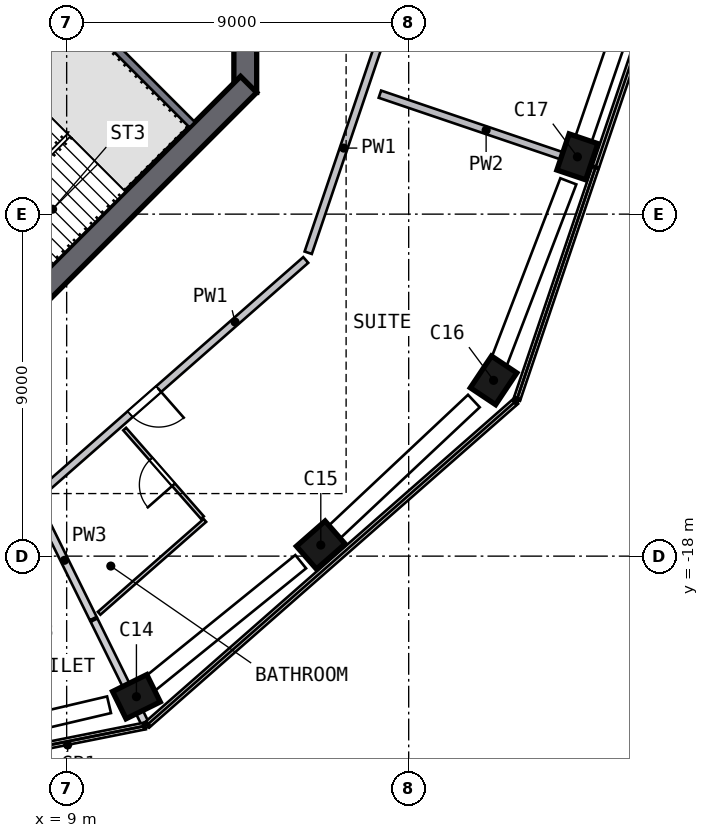
"""IFC4 building model, lengths in metres.
Left out: names, types, materials, properties, quantities, classifications, styles, units other than length and angle.
Written with IfcOpenShell. Run it as: python <this file> out.ifc"""

import sys

from ifc_helpers import new_model, si_unit, direction, frame, frame_2d, origin, origin_2d, place, context, subcontext, project, spatial, rectangle, extrude, element, fill, save


model = new_model("IFC4")
c1 = context("Model", 3, precision=1e-05, world=origin(), true_north=direction((0.0, 1.0)))
c2 = subcontext(c1, "Body", "Model", "MODEL_VIEW")
j1 = project(units=[si_unit("LENGTHUNIT", "METRE"), si_unit("PLANEANGLEUNIT", "RADIAN")], contexts=[c1])
p1 = place(None, origin())
s1 = spatial("IfcSite", under=j1, at=p1, CompositionType="ELEMENT")
p2 = place(p1, origin())
s2 = spatial("IfcBuilding", under=s1, at=p2, CompositionType="ELEMENT")
p3 = place(p2, frame((0.0, 0.0, 201.0)))
s3 = spatial("IfcBuildingStorey", under=s2, at=p3, CompositionType="ELEMENT", Elevation=201.0)
p4 = place(p3, frame((10.739, -21.748, 0.0), z_axis=(0.080316357, 0.040506371, 0.995946041), x_axis=(-0.893010518, -0.44095499, 0.08994949)))
e1 = element("IfcColumn", 1, at=p4, inside=s3, PredefinedType="COLUMN", context=c2, shape_type="SweptSolid", body=[
    extrude(rectangle(XDim=1.0, YDim=0.8, at=origin_2d()), origin(), (0.0, 0.0, 1.0), 4.207),
])
p5 = place(p3, frame((15.608, -17.779, 0.0), z_axis=(0.065415172, 0.058449937, 0.996144799), x_axis=(0.748393953, 0.65742794, -0.087721123)))
e2 = element("IfcColumn", 2, at=p5, inside=s3, PredefinedType="COLUMN", context=c2, shape_type="SweptSolid", body=[
    extrude(rectangle(XDim=1.0, YDim=0.8, at=origin_2d()), origin(), (0.0, 0.0, 1.0), 4.206),
])
p6 = place(p3, frame((20.174, -13.465, 0.0), z_axis=(0.049269396, 0.075209821, 0.995949803), x_axis=(-0.552777696, -0.828464484, 0.089907833)))
e3 = element("IfcColumn", 3, at=p6, inside=s3, PredefinedType="COLUMN", context=c2, shape_type="SweptSolid", body=[
    extrude(rectangle(XDim=1.0, YDim=0.8, at=origin_2d()), origin(), (0.0, 0.0, 1.0), 4.207),
])
p7 = place(p3, frame((22.407, -7.593, 0.0), z_axis=(0.027454561, 0.083350423, 0.996142035), x_axis=(0.319622961, 0.943472661, -0.0877525)))
e4 = element("IfcColumn", 4, at=p7, inside=s3, PredefinedType="COLUMN", context=c2, shape_type="SweptSolid", body=[
    extrude(rectangle(XDim=1.0, YDim=0.8, at=origin_2d()), origin(), (0.0, 0.0, 1.0), 4.206),
])
p8 = place(p3, frame((13.7, -5.799, 0.0), z_axis=(0.0, 0.0, 1.0), x_axis=(0.0, 1.0, 0.0)))
e5 = element("IfcWall", 5, at=p8, inside=s3, PredefinedType="SHEAR", context=c2, shape_type="SweptSolid", body=[
    extrude(rectangle(XDim=11.598, YDim=0.6, at=frame_2d((5.799, 0.0))), origin(), (0.0, 0.0, 1.0), 4.5),
])
p9 = place(p8, frame((4.899, 0.0, 0.0)))
e6 = element("IfcOpeningElement", 6, at=p9, cuts=e5, PredefinedType="OPENING", context=c2, shape_type="SweptSolid", body=[
    extrude(rectangle(XDim=1.8, YDim=2.1, at=frame_2d((0.9, 1.05))), frame((0.0, 0.31, 0.0), z_axis=(0.0, -1.0, 0.0), x_axis=(1.0, 0.0, 0.0)), (0.0, 0.0, 1.0), 0.62),
])
p10 = place(p3, frame((5.587, -13.788, 0.0), z_axis=(0.0, 0.0, 1.0), x_axis=(0.707106781, 0.707106781, 0.0)))
e7 = element("IfcWall", 7, at=p10, inside=s3, PredefinedType="SHEAR", context=c2, shape_type="SweptSolid", body=[
    extrude(rectangle(XDim=11.598, YDim=0.6, at=frame_2d((5.799, 0.0))), origin(), (0.0, 0.0, 1.0), 4.5),
])
p11 = place(p10, frame((2.099, 0.0, 0.0)))
e8 = element("IfcOpeningElement", 8, at=p11, cuts=e7, PredefinedType="OPENING", context=c2, shape_type="SweptSolid", body=[
    extrude(rectangle(XDim=1.2, YDim=2.1, at=frame_2d((0.6, 1.05))), frame((0.0, 0.31, 0.0), z_axis=(0.0, -1.0, 0.0), x_axis=(1.0, 0.0, 0.0)), (0.0, 0.0, 1.0), 0.62),
])
p12 = place(p3, frame((9.629, -3.24, 0.0), z_axis=(0.0, 0.0, 1.0), x_axis=(-0.707120946, -0.707092617, 0.0)))
e9 = element("IfcWall", 9, at=p12, inside=s3, PredefinedType="SOLIDWALL", context=c2, shape_type="SweptSolid", body=[
    extrude(rectangle(XDim=8.618, YDim=0.2, at=frame_2d((4.309, 0.0))), origin(), (0.0, 0.0, 1.0), 4.19),
])
p13 = place(p12, frame((7.018, 0.0, 0.0)))
e10 = element("IfcOpeningElement", 10, at=p13, cuts=e9, PredefinedType="OPENING", context=c2, shape_type="SweptSolid", body=[
    extrude(rectangle(XDim=1.2, YDim=2.1, at=frame_2d((0.6, 1.05))), frame((0.0, 0.11, 0.0), z_axis=(0.0, -1.0, 0.0), x_axis=(1.0, 0.0, 0.0)), (0.0, 0.0, 1.0), 0.22),
])
p14 = place(p3, frame((9.334, -3.677, 0.0), z_axis=(0.0, 0.0, 1.0), x_axis=(0.707135845, -0.707077716, 0.0)))
e11 = element("IfcWall", 11, at=p14, inside=s3, PredefinedType="SOLIDWALL", context=c2, shape_type="SweptSolid", body=[
    extrude(rectangle(XDim=4.2, YDim=0.2, at=frame_2d((2.1, 0.0))), origin(), (0.0, 0.0, 1.0), 4.19),
])
p15 = place(p3, frame((15.291, -10.206, 0.0), z_axis=(0.0, 0.0, 1.0), x_axis=(-0.75148862, -0.659746052, 0.0)))
e12 = element("IfcWall", 12, at=p15, inside=s3, PredefinedType="SOLIDWALL", context=c2, shape_type="SweptSolid", body=[
    extrude(rectangle(XDim=9.516, YDim=0.2, at=frame_2d((4.758, 0.0))), origin(), (0.0, 0.0, 1.0), 4.19),
])
p16 = place(p15, frame((5.15, 0.0, 0.0)))
e13 = element("IfcOpeningElement", 13, at=p16, cuts=e12, PredefinedType="OPENING", context=c2, shape_type="SweptSolid", body=[
    extrude(rectangle(XDim=1.0, YDim=2.1, at=frame_2d((0.5, 1.05))), frame((0.0, 0.11, 0.0), z_axis=(0.0, -1.0, 0.0), x_axis=(1.0, 0.0, 0.0)), (0.0, 0.0, 1.0), 0.22),
])
p17 = place(p3, frame((18.346, -1.193, 0.0), z_axis=(0.0, 0.0, 1.0), x_axis=(-0.320925337, -0.947104497, 0.0)))
e14 = element("IfcWall", 14, at=p17, inside=s3, PredefinedType="SOLIDWALL", context=c2, shape_type="SweptSolid", body=[
    extrude(rectangle(XDim=9.316, YDim=0.2, at=frame_2d((4.658, 0.0))), origin(), (0.0, 0.0, 1.0), 4.19),
])
p18 = place(p17, frame((1.5, 0.0, 0.0)))
e15 = element("IfcOpeningElement", 15, at=p18, cuts=e14, PredefinedType="OPENING", context=c2, shape_type="SweptSolid", body=[
    extrude(rectangle(XDim=1.8, YDim=2.1, at=frame_2d((0.9, 1.05))), frame((0.0, 0.11, 0.0), z_axis=(0.0, -1.0, 0.0), x_axis=(1.0, 0.0, 0.0)), (0.0, 0.0, 1.0), 0.22),
])
p19 = place(p3, frame((22.833, -7.737, 0.0), z_axis=(0.0, 0.0, 1.0), x_axis=(-0.947108286, 0.320914153, 0.0)))
e16 = element("IfcWall", 16, at=p19, inside=s3, PredefinedType="SOLIDWALL", context=c2, shape_type="SweptSolid", body=[
    extrude(rectangle(XDim=5.903, YDim=0.2, at=frame_2d((2.951, 0.0))), origin(), (0.0, 0.0, 1.0), 4.19),
])
p20 = place(p3, frame((12.638, -17.06, 0.0), z_axis=(0.0, 0.0, 1.0), x_axis=(-0.751489638, -0.659744893, 0.0)))
e17 = element("IfcWall", 17, at=p20, inside=s3, PredefinedType="PARTITIONING", context=c2, shape_type="SweptSolid", body=[
    extrude(rectangle(XDim=3.704, YDim=0.1, at=frame_2d((1.852, 0.0))), origin(), (0.0, 0.0, 1.0), 4.19),
])
p21 = place(p3, frame((12.572, -16.985, 0.0), z_axis=(0.0, 0.0, 1.0), x_axis=(-0.65970247, 0.75152688, 0.0)))
e18 = element("IfcWall", 18, at=p21, inside=s3, PredefinedType="PARTITIONING", context=c2, shape_type="SweptSolid", body=[
    extrude(rectangle(XDim=3.1, YDim=0.1, at=frame_2d((1.55, 0.0))), origin(), (0.0, 0.0, 1.0), 4.19),
])
p22 = place(p21, frame((1.15, 0.0, 0.0)))
e19 = element("IfcOpeningElement", 19, at=p22, cuts=e18, PredefinedType="OPENING", context=c2, shape_type="SweptSolid", body=[
    extrude(rectangle(XDim=0.9, YDim=2.1, at=frame_2d((0.45, 1.05))), frame((0.0, 0.06, 0.0), z_axis=(0.0, -1.0, 0.0), x_axis=(1.0, 0.0, 0.0)), (0.0, 0.0, 1.0), 0.12),
])
p23 = place(p3, frame((8.186, -16.577, 0.0), z_axis=(0.0, 0.0, 1.0), x_axis=(0.442780312, -0.896630133, 0.0)))
e20 = element("IfcWall", 20, at=p23, inside=s3, PredefinedType="SOLIDWALL", context=c2, shape_type="SweptSolid", body=[
    extrude(rectangle(XDim=3.418, YDim=0.2, at=frame_2d((1.709, 0.0))), origin(), (0.0, 0.0, 1.0), 4.19),
])
p24 = place(p3, frame((9.72, -19.684, 0.0), z_axis=(0.0, 0.0, 1.0), x_axis=(0.442732837, -0.896653576, 0.0)))
e21 = element("IfcWall", 21, at=p24, inside=s3, PredefinedType="SOLIDWALL", context=c2, shape_type="SweptSolid", body=[
    extrude(rectangle(XDim=3.011, YDim=0.2, at=frame_2d((1.506, 0.0))), origin(), (0.0, 0.0, 1.0), 4.19),
])
p25 = place(p16, origin())
e22 = element("IfcDoor", 22, at=p25, inside=s3, OperationType="SINGLE_SWING_LEFT", PredefinedType="DOOR", context=c2, shape_type="SweptSolid", body=[
    extrude(rectangle(XDim=1.0, YDim=2.1, at=frame_2d((0.5, 1.05))), frame((0.0, 0.025, 0.0), z_axis=(0.0, -1.0, 0.0), x_axis=(1.0, 0.0, 0.0)), (0.0, 0.0, 1.0), 0.05),
])
fill(e13, e22)
p26 = place(p22, origin())
e23 = element("IfcDoor", 23, at=p26, inside=s3, OperationType="SINGLE_SWING_LEFT", PredefinedType="DOOR", context=c2, shape_type="SweptSolid", body=[
    extrude(rectangle(XDim=0.9, YDim=2.1, at=frame_2d((0.45, 1.05))), frame((0.0, 0.025, 0.0), z_axis=(0.0, -1.0, 0.0), x_axis=(1.0, 0.0, 0.0)), (0.0, 0.0, 1.0), 0.05),
])
fill(e19, e23)
save(model, sys.argv[1])
